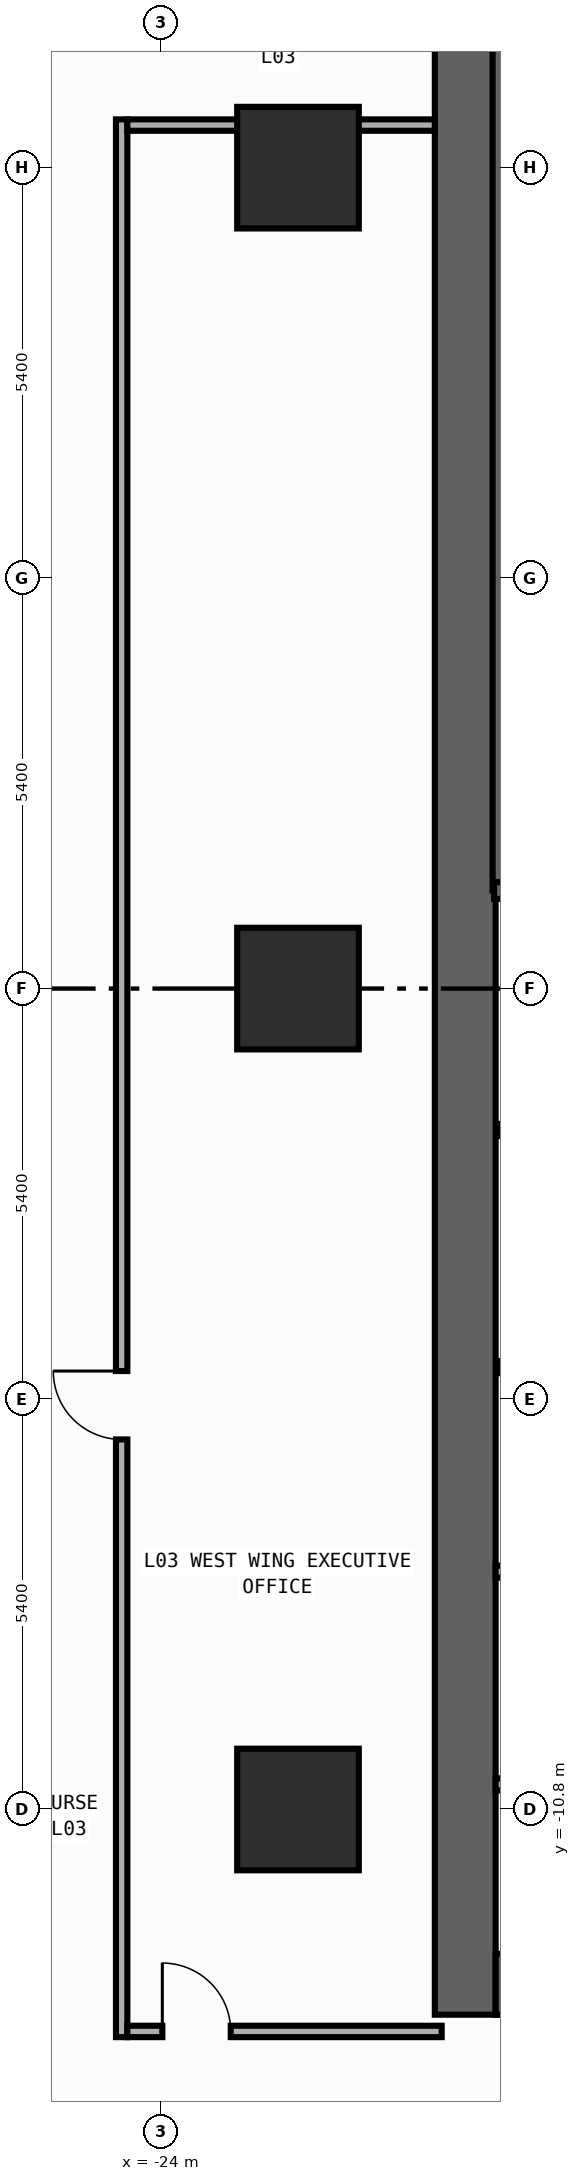
"""IFC4 building model, lengths in metres.
Left out: names, types, materials, properties, quantities, classifications, styles, units other than length and angle.
Written with IfcOpenShell. Run it as: python <this file> out.ifc"""

import sys

from ifc_helpers import new_model, si_unit, direction, frame, frame_2d, origin, origin_2d, place, context, subcontext, project, spatial, rectangle, extrude, element, fill, save


model = new_model("IFC4")
c1 = context("Model", 3, precision=1e-05, world=origin(), true_north=direction((0.0, 1.0)))
c2 = subcontext(c1, "Body", "Model", "MODEL_VIEW")
j1 = project(units=[si_unit("LENGTHUNIT", "METRE"), si_unit("PLANEANGLEUNIT", "RADIAN")], contexts=[c1])
p1 = place(None, origin())
s1 = spatial("IfcSite", under=j1, at=p1, CompositionType="ELEMENT")
p2 = place(p1, origin())
s2 = spatial("IfcBuilding", under=s1, at=p2, CompositionType="ELEMENT")
p3 = place(p2, frame((0.0, 0.0, 11.0)))
s3 = spatial("IfcBuildingStorey", under=s2, at=p3, CompositionType="ELEMENT", Elevation=11.0)
p4 = place(p3, frame((-20.0, -13.5, 0.0), z_axis=(0.0, 0.0, 1.0), x_axis=(0.0, 1.0, 0.0)))
e1 = element("IfcWall", 1, at=p4, inside=s3, PredefinedType="SHEAR", context=c2, shape_type="SweptSolid", body=[
    extrude(rectangle(XDim=27.0, YDim=0.8, at=frame_2d((13.5, 0.0))), origin(), (0.0, 0.0, 1.0), 4.7),
])
p5 = place(p3, frame((-19.6, -13.1, 0.0), z_axis=(0.0, 0.0, 1.0), x_axis=(1.0, 0.0, 0.0)))
e2 = element("IfcWall", 2, at=p5, inside=s3, PredefinedType="SHEAR", context=c2, shape_type="SweptSolid", body=[
    extrude(rectangle(XDim=6.8, YDim=0.8, at=frame_2d((3.4, 0.0))), origin(), (0.0, 0.0, 1.0), 4.7),
])
p6 = place(p3, frame((-19.53, 1.29, 0.0), z_axis=(0.0, 0.0, 1.0), x_axis=(0.0, 1.0, 0.0)))
e3 = element("IfcWall", 3, at=p6, inside=s3, PredefinedType="SHEAR", context=c2, shape_type="SweptSolid", body=[
    extrude(rectangle(XDim=11.3, YDim=0.22, at=frame_2d((5.65, 0.0))), origin(), (0.0, 0.0, 1.0), 4.7),
])
p7 = place(p3, frame((-19.62, 1.29, 0.0), z_axis=(0.0, 0.0, 1.0), x_axis=(1.0, 0.0, 0.0)))
e4 = element("IfcWall", 4, at=p7, inside=s3, PredefinedType="SHEAR", context=c2, shape_type="SweptSolid", body=[
    extrude(rectangle(XDim=3.915, YDim=0.22, at=frame_2d((1.958, 0.0))), origin(), (0.0, 0.0, 1.0), 4.7),
])
p8 = place(p7, frame((1.08, 0.0, 0.0)))
e5 = element("IfcOpeningElement", 5, at=p8, cuts=e4, PredefinedType="OPENING", context=c2, shape_type="SweptSolid", body=[
    extrude(rectangle(XDim=1.1, YDim=2.2, at=frame_2d((0.55, 1.1))), frame((0.0, 0.12, 0.0), z_axis=(0.0, -1.0, 0.0), x_axis=(1.0, 0.0, 0.0)), (0.0, 0.0, 1.0), 0.24),
])
for number, where, z_axis, x_axis in (
    (6, (-22.2, -10.8, 0.0), (0.0, 0.0, 1.0), (1.0, 0.0, 0.0)),
    (7, (-22.2, 0.0, 0.0), (0.0, 0.0, 1.0), (1.0, 0.0, 0.0)),
    (8, (-22.2, 10.8, 0.0), (0.0, 0.0, 1.0), (1.0, 0.0, 0.0)),
):
    element("IfcColumn", number, at=place(p3, frame(where, z_axis=z_axis, x_axis=x_axis)), inside=s3, PredefinedType="COLUMN", context=c2, shape_type="SweptSolid", body=[
        extrude(rectangle(XDim=1.6, YDim=1.6, at=origin_2d()), origin(), (0.0, 0.0, 1.0), 5.0),
    ])
p9 = place(p3, frame((-19.55, -1.86, 0.0), z_axis=(0.0, 0.0, 1.0), x_axis=(1.0, 0.0, 0.0)))
e9 = element("IfcWall", 9, at=p9, inside=s3, PredefinedType="STANDARD", context=c2, shape_type="SweptSolid", body=[
    extrude(rectangle(XDim=3.8, YDim=0.16, at=frame_2d((1.9, 0.0))), origin(), (0.0, 0.0, 1.0), 4.7),
])
p10 = place(p9, frame((1.18, 0.0, 0.0)))
e10 = element("IfcOpeningElement", 10, at=p10, cuts=e9, PredefinedType="OPENING", context=c2, shape_type="SweptSolid", body=[
    extrude(rectangle(XDim=1.15, YDim=2.2, at=frame_2d((0.575, 1.1))), frame((0.0, 0.09, 0.0), z_axis=(0.0, -1.0, 0.0), x_axis=(1.0, 0.0, 0.0)), (0.0, 0.0, 1.0), 0.18),
])
p11 = place(p3, frame((-19.55, -4.98, 0.0), z_axis=(0.0, 0.0, 1.0), x_axis=(1.0, 0.0, 0.0)))
e11 = element("IfcWall", 11, at=p11, inside=s3, PredefinedType="STANDARD", context=c2, shape_type="SweptSolid", body=[
    extrude(rectangle(XDim=3.8, YDim=0.16, at=frame_2d((1.9, 0.0))), origin(), (0.0, 0.0, 1.0), 4.7),
])
for number, where, z_axis, x_axis in (
    (12, (-19.6, -10.47, 0.0), (0.0, 0.0, 1.0), (1.0, 0.0, 0.0)),
    (13, (-19.6, -7.67, 0.0), (0.0, 0.0, 1.0), (1.0, 0.0, 0.0)),
):
    element("IfcWall", number, at=place(p3, frame(where, z_axis=z_axis, x_axis=x_axis)), inside=s3, PredefinedType="PARTITIONING", context=c2, shape_type="SweptSolid", body=[
        extrude(rectangle(XDim=2.29, YDim=0.16, at=frame_2d((1.145, 0.0))), origin(), (0.0, 0.0, 1.0), 4.7),
    ])
p12 = place(p3, frame((-24.52, -13.795, 0.0), z_axis=(0.0, 0.0, 1.0), x_axis=(0.0, 1.0, 0.0)))
e14 = element("IfcWall", 14, at=p12, inside=s3, PredefinedType="PARTITIONING", context=c2, shape_type="SweptSolid", body=[
    extrude(rectangle(XDim=25.23, YDim=0.15, at=frame_2d((12.615, 0.0))), origin(), (0.0, 0.0, 1.0), 4.7),
])
p13 = place(p12, frame((7.863, 0.0, 0.0)))
e15 = element("IfcOpeningElement", 15, at=p13, cuts=e14, PredefinedType="OPENING", context=c2, shape_type="SweptSolid", body=[
    extrude(rectangle(XDim=0.9, YDim=2.15, at=frame_2d((0.45, 1.075))), frame((0.0, 0.085, 0.0), z_axis=(0.0, -1.0, 0.0), x_axis=(1.0, 0.0, 0.0)), (0.0, 0.0, 1.0), 0.17),
])
p14 = place(p3, frame((-24.445, -13.72, 0.0), z_axis=(0.0, 0.0, 1.0), x_axis=(1.0, 0.0, 0.0)))
e16 = element("IfcWall", 16, at=p14, inside=s3, PredefinedType="PARTITIONING", context=c2, shape_type="SweptSolid", body=[
    extrude(rectangle(XDim=4.135, YDim=0.15, at=frame_2d((2.067, 0.0))), origin(), (0.0, 0.0, 1.0), 4.7),
])
p15 = place(p14, frame((0.46, 0.0, 0.0)))
e17 = element("IfcOpeningElement", 17, at=p15, cuts=e16, PredefinedType="OPENING", context=c2, shape_type="SweptSolid", body=[
    extrude(rectangle(XDim=0.9, YDim=2.15, at=frame_2d((0.45, 1.075))), frame((0.0, 0.085, 0.0), z_axis=(0.0, -1.0, 0.0), x_axis=(1.0, 0.0, 0.0)), (0.0, 0.0, 1.0), 0.17),
])
p16 = place(p3, frame((-24.445, 11.36, 0.0), z_axis=(0.0, 0.0, 1.0), x_axis=(1.0, 0.0, 0.0)))
e18 = element("IfcWall", 18, at=p16, inside=s3, PredefinedType="PARTITIONING", context=c2, shape_type="SweptSolid", body=[
    extrude(rectangle(XDim=4.045, YDim=0.15, at=frame_2d((2.022, 0.0))), origin(), (0.0, 0.0, 1.0), 4.7),
])
p17 = place(p13, origin())
e19 = element("IfcDoor", 19, at=p17, inside=s3, OperationType="SINGLE_SWING_RIGHT", PredefinedType="DOOR", context=c2, shape_type="SweptSolid", body=[
    extrude(rectangle(XDim=0.9, YDim=2.15, at=frame_2d((0.45, 1.075))), frame((0.0, 0.025, 0.0), z_axis=(0.0, -1.0, 0.0), x_axis=(1.0, 0.0, 0.0)), (0.0, 0.0, 1.0), 0.05),
])
fill(e15, e19)
p18 = place(p15, origin())
e20 = element("IfcDoor", 20, at=p18, inside=s3, OperationType="SINGLE_SWING_LEFT", PredefinedType="DOOR", context=c2, shape_type="SweptSolid", body=[
    extrude(rectangle(XDim=0.9, YDim=2.15, at=frame_2d((0.45, 1.075))), frame((0.0, 0.025, 0.0), z_axis=(0.0, -1.0, 0.0), x_axis=(1.0, 0.0, 0.0)), (0.0, 0.0, 1.0), 0.05),
])
fill(e17, e20)
save(model, sys.argv[1])
